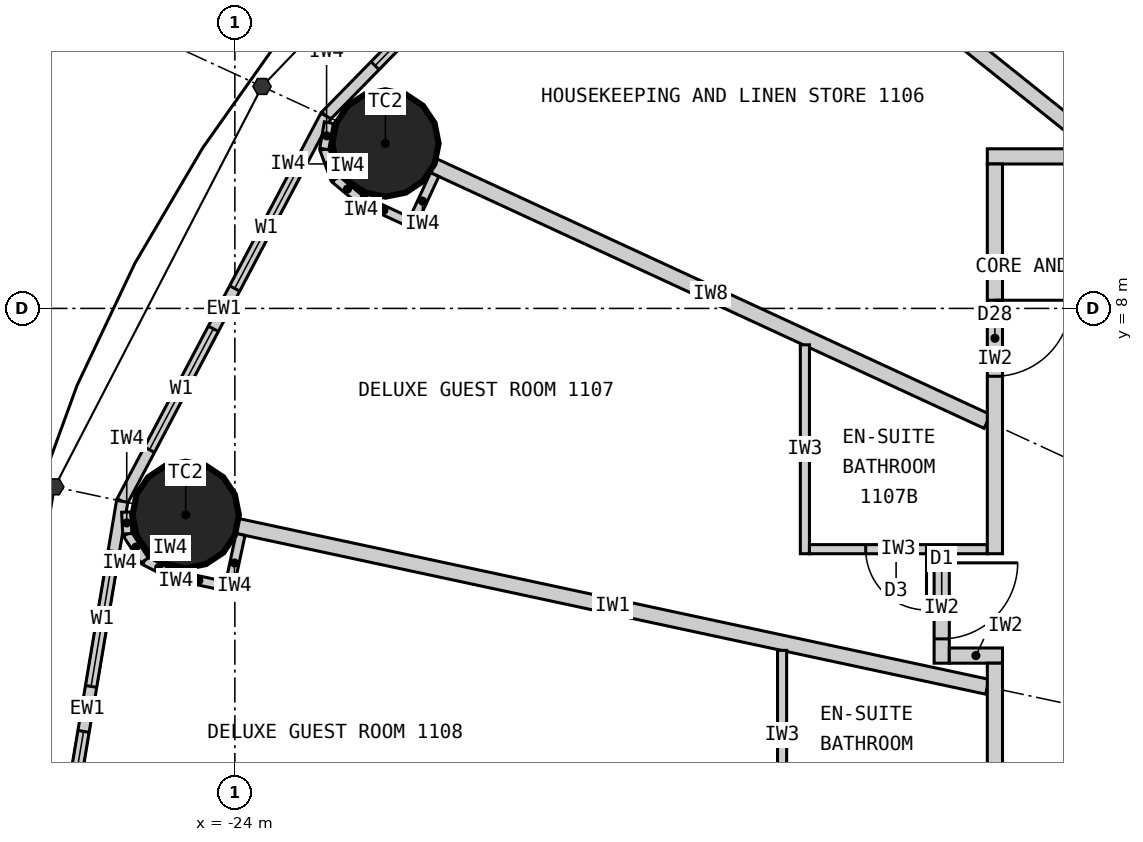
"""IFC4 building model, lengths in metres.
Left out: names, types, materials, properties, quantities, classifications, styles, units other than length and angle.
Written with IfcOpenShell. Run it as: python <this file> out.ifc"""

import sys

from ifc_helpers import new_model, si_unit, direction, frame, frame_2d, origin, origin_2d, place, context, subcontext, project, spatial, rectangle, circle, extrude, element, fill, save


model = new_model("IFC4")
c1 = context("Model", 3, precision=1e-05, world=origin(), true_north=direction((0.0, 1.0)))
c2 = subcontext(c1, "Body", "Model", "MODEL_VIEW")
j1 = project(units=[si_unit("LENGTHUNIT", "METRE"), si_unit("PLANEANGLEUNIT", "RADIAN")], contexts=[c1])
p1 = place(None, origin())
s1 = spatial("IfcSite", under=j1, at=p1, CompositionType="ELEMENT")
p2 = place(p1, origin())
s2 = spatial("IfcBuilding", under=s1, at=p2, CompositionType="ELEMENT")
p3 = place(p2, frame((0.0, 0.0, 50.7)))
s3 = spatial("IfcBuildingStorey", under=s2, at=p3, CompositionType="ELEMENT", Elevation=50.7)
for number, where, z_axis, x_axis in (
    (1, (-22.019, 10.17, 0.0), (0.0, 0.0, 1.0), (1.0, 0.0, 0.0)),
    (2, (-24.647, 5.283, 0.0), (0.0, 0.0, 1.0), (1.0, 0.0, 0.0)),
):
    element("IfcColumn", number, at=place(p3, frame(where, z_axis=z_axis, x_axis=x_axis)), inside=s3, PredefinedType="COLUMN", context=c2, shape_type="SweptSolid", body=[
        extrude(circle(Radius=0.7, at=origin_2d()), origin(), (0.0, 0.0, 1.0), 3.3),
    ])
p4 = place(p3, frame((-18.57, 14.856, 0.0), z_axis=(0.0, 0.0, 1.0), x_axis=(-0.699602905915, -0.714531856557, 0.0)))
e3 = element("IfcWall", 3, at=p4, inside=s3, PredefinedType="ELEMENTEDWALL", context=c2, shape_type="SweptSolid", body=[
    extrude(rectangle(XDim=6.051, YDim=0.15, at=frame_2d((3.025, 0.0))), origin(), (0.0, 0.0, 1.0), 3.12),
])
p5 = place(p4, frame((0.926, 0.0, 0.9)))
e4 = element("IfcOpeningElement", 4, at=p5, cuts=e3, PredefinedType="OPENING", context=c2, shape_type="SweptSolid", body=[
    extrude(rectangle(XDim=1.8, YDim=1.9, at=frame_2d((0.9, 0.95))), frame((0.0, 0.085, 0.0), z_axis=(0.0, -1.0, 0.0), x_axis=(1.0, 0.0, 0.0)), (0.0, 0.0, 1.0), 0.17),
])
p6 = place(p4, frame((3.325, 0.0, 0.9)))
e5 = element("IfcOpeningElement", 5, at=p6, cuts=e3, PredefinedType="OPENING", context=c2, shape_type="SweptSolid", body=[
    extrude(rectangle(XDim=1.8, YDim=1.9, at=frame_2d((0.9, 0.95))), frame((0.0, 0.085, 0.0), z_axis=(0.0, -1.0, 0.0), x_axis=(1.0, 0.0, 0.0)), (0.0, 0.0, 1.0), 0.17),
])
p7 = place(p3, frame((-22.803, 10.532, 0.0), z_axis=(0.0, 0.0, 1.0), x_axis=(-0.467296867008, -0.884100468321, 0.0)))
e6 = element("IfcWall", 6, at=p7, inside=s3, PredefinedType="ELEMENTEDWALL", context=c2, shape_type="SweptSolid", body=[
    extrude(rectangle(XDim=5.734, YDim=0.15, at=frame_2d((2.867, 0.0))), origin(), (0.0, 0.0, 1.0), 3.12),
])
p8 = place(p7, frame((0.767, 0.0, 0.9)))
e7 = element("IfcOpeningElement", 7, at=p8, cuts=e6, PredefinedType="OPENING", context=c2, shape_type="SweptSolid", body=[
    extrude(rectangle(XDim=1.8, YDim=1.9, at=frame_2d((0.9, 0.95))), frame((0.0, 0.085, 0.0), z_axis=(0.0, -1.0, 0.0), x_axis=(1.0, 0.0, 0.0)), (0.0, 0.0, 1.0), 0.17),
])
p9 = place(p7, frame((3.167, 0.0, 0.9)))
e8 = element("IfcOpeningElement", 8, at=p9, cuts=e6, PredefinedType="OPENING", context=c2, shape_type="SweptSolid", body=[
    extrude(rectangle(XDim=1.8, YDim=1.9, at=frame_2d((0.9, 0.95))), frame((0.0, 0.085, 0.0), z_axis=(0.0, -1.0, 0.0), x_axis=(1.0, 0.0, 0.0)), (0.0, 0.0, 1.0), 0.17),
])
p10 = place(p3, frame((-25.482, 5.462, 0.0), z_axis=(0.0, 0.0, 1.0), x_axis=(-0.165642551694, -0.986185857264, 0.0)))
e9 = element("IfcWall", 9, at=p10, inside=s3, PredefinedType="ELEMENTEDWALL", context=c2, shape_type="SweptSolid", body=[
    extrude(rectangle(XDim=5.539, YDim=0.15, at=frame_2d((2.77, 0.0))), origin(), (0.0, 0.0, 1.0), 3.12),
])
p11 = place(p10, frame((0.669, 0.0, 0.9)))
e10 = element("IfcOpeningElement", 10, at=p11, cuts=e9, PredefinedType="OPENING", context=c2, shape_type="SweptSolid", body=[
    extrude(rectangle(XDim=1.8, YDim=1.9, at=frame_2d((0.9, 0.95))), frame((0.0, 0.085, 0.0), z_axis=(0.0, -1.0, 0.0), x_axis=(1.0, 0.0, 0.0)), (0.0, 0.0, 1.0), 0.17),
])
p12 = place(p10, frame((3.07, 0.0, 0.9)))
e11 = element("IfcOpeningElement", 11, at=p12, cuts=e9, PredefinedType="OPENING", context=c2, shape_type="SweptSolid", body=[
    extrude(rectangle(XDim=1.8, YDim=1.9, at=frame_2d((0.9, 0.95))), frame((0.0, 0.085, 0.0), z_axis=(0.0, -1.0, 0.0), x_axis=(1.0, 0.0, 0.0)), (0.0, 0.0, 1.0), 0.17),
])
p13 = place(p3, frame((-12.625, 10.1, 0.0), z_axis=(0.0, 0.0, 1.0), x_axis=(-0.780892451574, 0.624665493744, 0.0)))
e12 = element("IfcWall", 12, at=p13, inside=s3, PredefinedType="PARTITIONING", context=c2, shape_type="SweptSolid", body=[
    extrude(rectangle(XDim=6.045, YDim=0.2, at=frame_2d((3.022, 0.0))), origin(), (0.0, 0.0, 1.0), 2.32),
])
p14 = place(p3, frame((-14.1, 6.512, 0.0), z_axis=(0.0, 0.0, 1.0), x_axis=(-0.907832871056, 0.419332181247, 0.0)))
e13 = element("IfcWall", 13, at=p14, inside=s3, PredefinedType="PARTITIONING", context=c2, shape_type="SweptSolid", body=[
    extrude(rectangle(XDim=8.023, YDim=0.2, at=frame_2d((4.011, 0.0))), origin(), (0.0, 0.0, 1.0), 2.32),
])
p15 = place(p3, frame((-14.1, 3.022, 0.0), z_axis=(0.0, 0.0, 1.0), x_axis=(-0.977790014929, 0.209586943072, 0.0)))
e14 = element("IfcWall", 14, at=p15, inside=s3, PredefinedType="PARTITIONING", context=c2, shape_type="SweptSolid", body=[
    extrude(rectangle(XDim=10.087, YDim=0.2, at=frame_2d((5.043, 0.0))), origin(), (0.0, 0.0, 1.0), 2.32),
])
p16 = place(p3, frame((-16.5, 7.521, 0.0), z_axis=(0.0, 0.0, 1.0), x_axis=(0.0, -1.0, 0.0)))
e15 = element("IfcWall", 15, at=p16, inside=s3, PredefinedType="PARTITIONING", context=c2, shape_type="SweptSolid", body=[
    extrude(rectangle(XDim=2.749, YDim=0.12, at=frame_2d((1.374, 0.0))), origin(), (0.0, 0.0, 1.0), 3.12),
])
p17 = place(p3, frame((-14.1, 4.833, 0.0), z_axis=(0.0, 0.0, 1.0), x_axis=(-1.0, 0.0, 0.0)))
e16 = element("IfcWall", 16, at=p17, inside=s3, PredefinedType="PARTITIONING", context=c2, shape_type="SweptSolid", body=[
    extrude(rectangle(XDim=2.34, YDim=0.12, at=frame_2d((1.17, 0.0))), origin(), (0.0, 0.0, 1.0), 3.12),
])
p18 = place(p17, frame((0.8, 0.0, 0.0)))
e17 = element("IfcOpeningElement", 17, at=p18, cuts=e16, PredefinedType="OPENING", context=c2, shape_type="SweptSolid", body=[
    extrude(rectangle(XDim=0.8, YDim=2.1, at=frame_2d((0.4, 1.05))), frame((0.0, 0.07, 0.0), z_axis=(0.0, -1.0, 0.0), x_axis=(1.0, 0.0, 0.0)), (0.0, 0.0, 1.0), 0.14),
])
p19 = place(p3, frame((-16.8, 3.501, 0.0), z_axis=(0.0, 0.0, 1.0), x_axis=(0.0, -1.0, 0.0)))
e18 = element("IfcWall", 18, at=p19, inside=s3, PredefinedType="PARTITIONING", context=c2, shape_type="SweptSolid", body=[
    extrude(rectangle(XDim=2.219, YDim=0.12, at=frame_2d((1.109, 0.0))), origin(), (0.0, 0.0, 1.0), 3.12),
])
p20 = place(p3, frame((-14.7, 4.772, 0.0), z_axis=(0.0, 0.0, 1.0), x_axis=(0.0, -1.0, 0.0)))
e19 = element("IfcWall", 19, at=p20, inside=s3, PredefinedType="PARTITIONING", context=c2, shape_type="SweptSolid", body=[
    extrude(rectangle(XDim=1.44, YDim=0.2, at=frame_2d((0.72, 0.0))), origin(), (0.0, 0.0, 1.0), 3.12),
])
p21 = place(p20, frame((0.12, 0.0, 0.0)))
e20 = element("IfcOpeningElement", 20, at=p21, cuts=e19, PredefinedType="OPENING", context=c2, shape_type="SweptSolid", body=[
    extrude(rectangle(XDim=1.0, YDim=2.2, at=frame_2d((0.5, 1.1))), frame((0.0, 0.11, 0.0), z_axis=(0.0, -1.0, 0.0), x_axis=(1.0, 0.0, 0.0)), (0.0, 0.0, 1.0), 0.22),
])
p22 = place(p3, frame((-13.9, 3.433, 0.0), z_axis=(0.0, 0.0, 1.0), x_axis=(-1.0, 0.0, 0.0)))
e21 = element("IfcWall", 21, at=p22, inside=s3, PredefinedType="PARTITIONING", context=c2, shape_type="SweptSolid", body=[
    extrude(rectangle(XDim=0.7, YDim=0.2, at=frame_2d((0.35, 0.0))), origin(), (0.0, 0.0, 1.0), 2.32),
])
p23 = place(p3, frame((-14.1, 10.0, 0.0), z_axis=(0.0, 0.0, 1.0), x_axis=(1.0, 0.0, 0.0)))
e22 = element("IfcWall", 22, at=p23, inside=s3, PredefinedType="PARTITIONING", context=c2, shape_type="SweptSolid", body=[
    extrude(rectangle(XDim=4.931, YDim=0.2, at=frame_2d((2.466, 0.0))), origin(), (0.0, 0.0, 1.0), 3.12),
])
p24 = place(p3, frame((-14.0, 9.9, 0.0), z_axis=(0.0, 0.0, 1.0), x_axis=(0.0, -1.0, 0.0)))
e23 = element("IfcWall", 23, at=p24, inside=s3, PredefinedType="PARTITIONING", context=c2, shape_type="SweptSolid", body=[
    extrude(rectangle(XDim=5.127, YDim=0.2, at=frame_2d((2.564, 0.0))), origin(), (0.0, 0.0, 1.0), 3.12),
])
p25 = place(p24, frame((1.792, 0.0, 0.0)))
e24 = element("IfcOpeningElement", 24, at=p25, cuts=e23, PredefinedType="OPENING", context=c2, shape_type="SweptSolid", body=[
    extrude(rectangle(XDim=1.0, YDim=2.2, at=frame_2d((0.5, 1.1))), frame((0.0, 0.11, 0.0), z_axis=(0.0, -1.0, 0.0), x_axis=(1.0, 0.0, 0.0)), (0.0, 0.0, 1.0), 0.22),
])
p26 = place(p3, frame((-14.0, 3.333, 0.0), z_axis=(0.0, 0.0, 1.0), x_axis=(0.0, -1.0, 0.0)))
e25 = element("IfcWall", 25, at=p26, inside=s3, PredefinedType="PARTITIONING", context=c2, shape_type="SweptSolid", body=[
    extrude(rectangle(XDim=6.665, YDim=0.2, at=frame_2d((3.333, 0.0))), origin(), (0.0, 0.0, 1.0), 3.12),
])
p27 = place(p26, frame((2.15, 0.0, 0.0)))
e26 = element("IfcOpeningElement", 26, at=p27, cuts=e25, PredefinedType="OPENING", context=c2, shape_type="SweptSolid", body=[
    extrude(rectangle(XDim=1.0, YDim=2.2, at=frame_2d((0.5, 1.1))), frame((0.0, 0.11, 0.0), z_axis=(0.0, -1.0, 0.0), x_axis=(1.0, 0.0, 0.0)), (0.0, 0.0, 1.0), 0.22),
])
p28 = place(p26, frame((5.173, 0.0, 0.0)))
e27 = element("IfcOpeningElement", 27, at=p28, cuts=e25, PredefinedType="OPENING", context=c2, shape_type="SweptSolid", body=[
    extrude(rectangle(XDim=1.0, YDim=2.2, at=frame_2d((0.5, 1.1))), frame((0.0, 0.11, 0.0), z_axis=(0.0, -1.0, 0.0), x_axis=(1.0, 0.0, 0.0)), (0.0, 0.0, 1.0), 0.22),
])
p29 = place(p3, frame((-21.371, 9.761, 0.0), z_axis=(0.0, 0.0, 1.0), x_axis=(-0.419259891039, -0.907866258744, 0.0)))
e28 = element("IfcWall", 28, at=p29, inside=s3, PredefinedType="PARTITIONING", context=c2, shape_type="SweptSolid", body=[
    extrude(rectangle(XDim=0.768, YDim=0.12, at=frame_2d((0.384, 0.0))), origin(), (0.0, 0.0, 1.0), 3.12),
])
p30 = place(p3, frame((-21.722, 9.144, 0.0), z_axis=(0.0, 0.0, 1.0), x_axis=(-0.907877701396, 0.419235112208, 0.0)))
e29 = element("IfcWall", 29, at=p30, inside=s3, PredefinedType="PARTITIONING", context=c2, shape_type="SweptSolid", body=[
    extrude(rectangle(XDim=0.7, YDim=0.12, at=frame_2d((0.35, 0.0))), origin(), (0.0, 0.0, 1.0), 3.12),
])
p31 = place(p3, frame((-22.358, 9.437, 0.0), z_axis=(0.0, 0.0, 1.0), x_axis=(-0.768412687942, 0.639954639806, 0.0)))
e30 = element("IfcWall", 30, at=p31, inside=s3, PredefinedType="PARTITIONING", context=c2, shape_type="SweptSolid", body=[
    extrude(rectangle(XDim=0.418, YDim=0.12, at=frame_2d((0.209, 0.0))), origin(), (0.0, 0.0, 1.0), 3.12),
])
p32 = place(p3, frame((-22.679, 9.705, 0.0), z_axis=(0.0, 0.0, 1.0), x_axis=(-0.345164001646, 0.938542386879, 0.0)))
e31 = element("IfcWall", 31, at=p32, inside=s3, PredefinedType="PARTITIONING", context=c2, shape_type="SweptSolid", body=[
    extrude(rectangle(XDim=0.418, YDim=0.12, at=frame_2d((0.209, 0.0))), origin(), (0.0, 0.0, 1.0), 3.12),
])
p33 = place(p3, frame((-22.823, 10.097, 0.0), z_axis=(0.0, 0.0, 1.0), x_axis=(0.169674995186, 0.985500074079, 0.0)))
e32 = element("IfcWall", 32, at=p33, inside=s3, PredefinedType="PARTITIONING", context=c2, shape_type="SweptSolid", body=[
    extrude(rectangle(XDim=0.353, YDim=0.12, at=frame_2d((0.176, 0.0))), origin(), (0.0, 0.0, 1.0), 3.12),
])
p34 = place(p3, frame((-23.925, 5.026, 0.0), z_axis=(0.0, 0.0, 1.0), x_axis=(-0.209681192172, -0.977769808109, 0.0)))
e33 = element("IfcWall", 33, at=p34, inside=s3, PredefinedType="PARTITIONING", context=c2, shape_type="SweptSolid", body=[
    extrude(rectangle(XDim=0.767, YDim=0.12, at=frame_2d((0.384, 0.0))), origin(), (0.0, 0.0, 1.0), 3.12),
])
p35 = place(p3, frame((-24.132, 4.347, 0.0), z_axis=(0.0, 0.0, 1.0), x_axis=(-0.977776882509, 0.209648200638, 0.0)))
e34 = element("IfcWall", 34, at=p35, inside=s3, PredefinedType="PARTITIONING", context=c2, shape_type="SweptSolid", body=[
    extrude(rectangle(XDim=0.7, YDim=0.12, at=frame_2d((0.35, 0.0))), origin(), (0.0, 0.0, 1.0), 3.12),
])
for number, where, z_axis, x_axis in (
    (35, (-24.816, 4.494, 0.0), (0.0, 0.0, 1.0), (-0.89, 0.455, 0.0)),
    (36, (-25.188, 4.684, 0.0), (0.0, 0.0, 1.0), (-0.543, 0.84, 0.0)),
):
    element("IfcWall", number, at=place(p3, frame(where, z_axis=z_axis, x_axis=x_axis)), inside=s3, PredefinedType="PARTITIONING", context=c2, shape_type="SweptSolid", body=[
        extrude(rectangle(XDim=0.418, YDim=0.12, at=frame_2d((0.209, 0.0))), origin(), (0.0, 0.0, 1.0), 3.12),
    ])
p36 = place(p3, frame((-25.416, 5.035, 0.0), z_axis=(0.0, 0.0, 1.0), x_axis=(-0.050406329159, 0.998728793007, 0.0)))
e37 = element("IfcWall", 37, at=p36, inside=s3, PredefinedType="PARTITIONING", context=c2, shape_type="SweptSolid", body=[
    extrude(rectangle(XDim=0.286, YDim=0.12, at=frame_2d((0.143, 0.0))), origin(), (0.0, 0.0, 1.0), 3.12),
])
p37 = place(p6, origin())
e38 = element("IfcWindow", 38, at=p37, inside=s3, PartitioningType="SINGLE_PANEL", PredefinedType="WINDOW", context=c2, shape_type="SweptSolid", body=[
    extrude(rectangle(XDim=1.8, YDim=1.9, at=frame_2d((0.9, 0.95))), frame((0.0, 0.03, 0.0), z_axis=(0.0, -1.0, 0.0), x_axis=(1.0, 0.0, 0.0)), (0.0, 0.0, 1.0), 0.06),
])
fill(e5, e38)
p38 = place(p8, origin())
e39 = element("IfcWindow", 39, at=p38, inside=s3, PartitioningType="SINGLE_PANEL", PredefinedType="WINDOW", context=c2, shape_type="SweptSolid", body=[
    extrude(rectangle(XDim=1.8, YDim=1.9, at=frame_2d((0.9, 0.95))), frame((0.0, 0.03, 0.0), z_axis=(0.0, -1.0, 0.0), x_axis=(1.0, 0.0, 0.0)), (0.0, 0.0, 1.0), 0.06),
])
fill(e7, e39)
p39 = place(p9, origin())
e40 = element("IfcWindow", 40, at=p39, inside=s3, PartitioningType="SINGLE_PANEL", PredefinedType="WINDOW", context=c2, shape_type="SweptSolid", body=[
    extrude(rectangle(XDim=1.8, YDim=1.9, at=frame_2d((0.9, 0.95))), frame((0.0, 0.03, 0.0), z_axis=(0.0, -1.0, 0.0), x_axis=(1.0, 0.0, 0.0)), (0.0, 0.0, 1.0), 0.06),
])
fill(e8, e40)
p40 = place(p11, origin())
e41 = element("IfcWindow", 41, at=p40, inside=s3, PartitioningType="SINGLE_PANEL", PredefinedType="WINDOW", context=c2, shape_type="SweptSolid", body=[
    extrude(rectangle(XDim=1.8, YDim=1.9, at=frame_2d((0.9, 0.95))), frame((0.0, 0.03, 0.0), z_axis=(0.0, -1.0, 0.0), x_axis=(1.0, 0.0, 0.0)), (0.0, 0.0, 1.0), 0.06),
])
fill(e10, e41)
p41 = place(p12, origin())
e42 = element("IfcWindow", 42, at=p41, inside=s3, PartitioningType="SINGLE_PANEL", PredefinedType="WINDOW", context=c2, shape_type="SweptSolid", body=[
    extrude(rectangle(XDim=1.8, YDim=1.9, at=frame_2d((0.9, 0.95))), frame((0.0, 0.03, 0.0), z_axis=(0.0, -1.0, 0.0), x_axis=(1.0, 0.0, 0.0)), (0.0, 0.0, 1.0), 0.06),
])
fill(e11, e42)
p42 = place(p25, origin())
e43 = element("IfcDoor", 43, at=p42, inside=s3, OperationType="SINGLE_SWING_LEFT", PredefinedType="DOOR", context=c2, shape_type="SweptSolid", body=[
    extrude(rectangle(XDim=1.0, YDim=2.2, at=frame_2d((0.5, 1.1))), frame((0.0, 0.025, 0.0), z_axis=(0.0, -1.0, 0.0), x_axis=(1.0, 0.0, 0.0)), (0.0, 0.0, 1.0), 0.05),
])
fill(e24, e43)
p43 = place(p18, origin())
e44 = element("IfcDoor", 44, at=p43, inside=s3, OperationType="SINGLE_SWING_LEFT", PredefinedType="DOOR", context=c2, shape_type="SweptSolid", body=[
    extrude(rectangle(XDim=0.8, YDim=2.1, at=frame_2d((0.4, 1.05))), frame((0.0, 0.025, 0.0), z_axis=(0.0, -1.0, 0.0), x_axis=(1.0, 0.0, 0.0)), (0.0, 0.0, 1.0), 0.05),
])
fill(e17, e44)
p44 = place(p21, origin())
e45 = element("IfcDoor", 45, at=p44, inside=s3, OperationType="SINGLE_SWING_LEFT", PredefinedType="DOOR", context=c2, shape_type="SweptSolid", body=[
    extrude(rectangle(XDim=1.0, YDim=2.2, at=frame_2d((0.5, 1.1))), frame((0.0, 0.025, 0.0), z_axis=(0.0, -1.0, 0.0), x_axis=(1.0, 0.0, 0.0)), (0.0, 0.0, 1.0), 0.05),
])
fill(e20, e45)
save(model, sys.argv[1])
